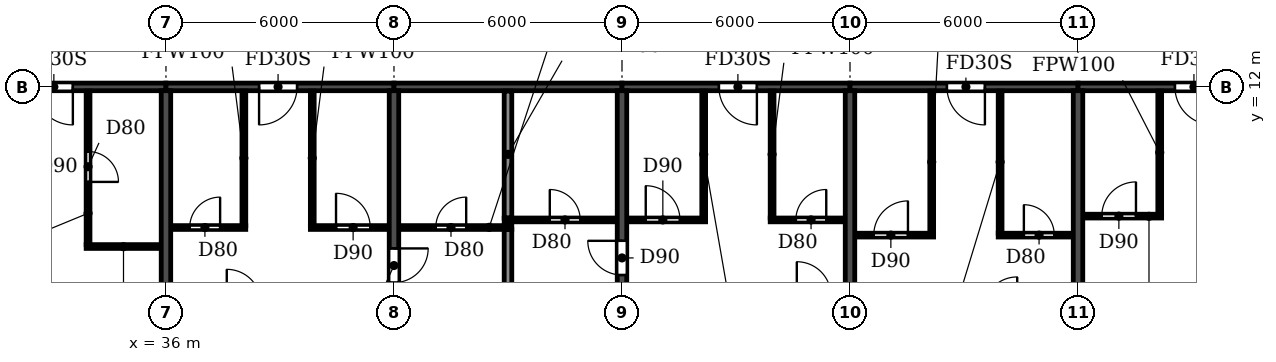
"""IFC4 building model, lengths in metres.
Left out: names, types, materials, properties, quantities, classifications, styles, units other than length and angle.
Written with IfcOpenShell. Run it as: python <this file> out.ifc"""

import sys

from ifc_helpers import new_model, si_unit, direction, frame, frame_2d, origin, place, context, subcontext, project, spatial, rectangle, extrude, element, fill, save


model = new_model("IFC4")
c1 = context("Model", 3, precision=1e-05, world=origin(), true_north=direction((0.0, 1.0)))
c2 = subcontext(c1, "Body", "Model", "MODEL_VIEW")
j1 = project(units=[si_unit("LENGTHUNIT", "METRE"), si_unit("PLANEANGLEUNIT", "RADIAN")], contexts=[c1])
p1 = place(None, origin())
s1 = spatial("IfcSite", under=j1, at=p1, CompositionType="ELEMENT")
p2 = place(p1, origin())
s2 = spatial("IfcBuilding", under=s1, at=p2, CompositionType="ELEMENT")
p3 = place(p2, frame((0.0, 0.0, 191.7)))
s3 = spatial("IfcBuildingStorey", under=s2, at=p3, CompositionType="ELEMENT", Elevation=191.7)
p4 = place(p3, frame((36.0, 0.2, 0.0), z_axis=(0.0, 0.0, 1.0), x_axis=(0.0, 1.0, 0.0)))
e1 = element("IfcWall", 1, at=p4, inside=s3, PredefinedType="SHEAR", context=c2, shape_type="SweptSolid", body=[
    extrude(rectangle(XDim=11.7, YDim=0.25, at=frame_2d((5.85, 0.0))), origin(), (0.0, 0.0, 1.0), 3.08),
])
p5 = place(p3, frame((42.0, 0.2, 0.0), z_axis=(0.0, 0.0, 1.0), x_axis=(0.0, 1.0, 0.0)))
e2 = element("IfcWall", 2, at=p5, inside=s3, PredefinedType="SHEAR", context=c2, shape_type="SweptSolid", body=[
    extrude(rectangle(XDim=11.7, YDim=0.25, at=frame_2d((5.85, 0.0))), origin(), (0.0, 0.0, 1.0), 3.08),
])
p6 = place(p5, frame((6.65, 0.0, 0.0)))
e3 = element("IfcOpeningElement", 3, at=p6, cuts=e2, PredefinedType="OPENING", context=c2, shape_type="SweptSolid", body=[
    extrude(rectangle(XDim=0.9, YDim=2.1, at=frame_2d((0.45, 1.05))), frame((0.0, 0.135, 0.0), z_axis=(0.0, -1.0, 0.0), x_axis=(1.0, 0.0, 0.0)), (0.0, 0.0, 1.0), 0.27),
])
p7 = place(p3, frame((48.0, 0.2, 0.0), z_axis=(0.0, 0.0, 1.0), x_axis=(0.0, 1.0, 0.0)))
e4 = element("IfcWall", 4, at=p7, inside=s3, PredefinedType="SHEAR", context=c2, shape_type="SweptSolid", body=[
    extrude(rectangle(XDim=11.7, YDim=0.25, at=frame_2d((5.85, 0.0))), origin(), (0.0, 0.0, 1.0), 3.08),
])
p8 = place(p7, frame((6.85, 0.0, 0.0)))
e5 = element("IfcOpeningElement", 5, at=p8, cuts=e4, PredefinedType="OPENING", context=c2, shape_type="SweptSolid", body=[
    extrude(rectangle(XDim=0.9, YDim=2.1, at=frame_2d((0.45, 1.05))), frame((0.0, 0.135, 0.0), z_axis=(0.0, -1.0, 0.0), x_axis=(1.0, 0.0, 0.0)), (0.0, 0.0, 1.0), 0.27),
])
for number, where, z_axis, x_axis in (
    (6, (54.0, 0.2, 0.0), (0.0, 0.0, 1.0), (0.0, 1.0, 0.0)),
    (7, (60.0, 0.2, 0.0), (0.0, 0.0, 1.0), (0.0, 1.0, 0.0)),
):
    element("IfcWall", number, at=place(p3, frame(where, z_axis=z_axis, x_axis=x_axis)), inside=s3, PredefinedType="SHEAR", context=c2, shape_type="SweptSolid", body=[
        extrude(rectangle(XDim=11.7, YDim=0.25, at=frame_2d((5.85, 0.0))), origin(), (0.0, 0.0, 1.0), 3.08),
    ])
p9 = place(p3, frame((30.0, 12.0, 0.0), z_axis=(0.0, 0.0, 1.0), x_axis=(1.0, 0.0, 0.0)))
e8 = element("IfcWall", 8, at=p9, inside=s3, PredefinedType="SHEAR", context=c2, shape_type="SweptSolid", body=[
    extrude(rectangle(XDim=6.0, YDim=0.2, at=frame_2d((3.0, 0.0))), origin(), (0.0, 0.0, 1.0), 2.48),
])
p10 = place(p9, frame((2.55, 0.0, 0.0)))
e9 = element("IfcOpeningElement", 9, at=p10, cuts=e8, PredefinedType="OPENING", context=c2, shape_type="SweptSolid", body=[
    extrude(rectangle(XDim=1.0, YDim=2.1, at=frame_2d((0.5, 1.05))), frame((0.0, 0.11, 0.0), z_axis=(0.0, -1.0, 0.0), x_axis=(1.0, 0.0, 0.0)), (0.0, 0.0, 1.0), 0.22),
])
p11 = place(p3, frame((36.0, 12.0, 0.0), z_axis=(0.0, 0.0, 1.0), x_axis=(1.0, 0.0, 0.0)))
e10 = element("IfcWall", 10, at=p11, inside=s3, PredefinedType="SHEAR", context=c2, shape_type="SweptSolid", body=[
    extrude(rectangle(XDim=6.0, YDim=0.2, at=frame_2d((3.0, 0.0))), origin(), (0.0, 0.0, 1.0), 2.48),
])
p12 = place(p11, frame((2.45, 0.0, 0.0)))
e11 = element("IfcOpeningElement", 11, at=p12, cuts=e10, PredefinedType="OPENING", context=c2, shape_type="SweptSolid", body=[
    extrude(rectangle(XDim=1.0, YDim=2.1, at=frame_2d((0.5, 1.05))), frame((0.0, 0.11, 0.0), z_axis=(0.0, -1.0, 0.0), x_axis=(1.0, 0.0, 0.0)), (0.0, 0.0, 1.0), 0.22),
])
p13 = place(p3, frame((42.0, 12.0, 0.0), z_axis=(0.0, 0.0, 1.0), x_axis=(1.0, 0.0, 0.0)))
e12 = element("IfcWall", 12, at=p13, inside=s3, PredefinedType="SHEAR", context=c2, shape_type="SweptSolid", body=[
    extrude(rectangle(XDim=6.0, YDim=0.2, at=frame_2d((3.0, 0.0))), origin(), (0.0, 0.0, 1.0), 2.48),
])
p14 = place(p3, frame((48.0, 12.0, 0.0), z_axis=(0.0, 0.0, 1.0), x_axis=(1.0, 0.0, 0.0)))
e13 = element("IfcWall", 13, at=p14, inside=s3, PredefinedType="SHEAR", context=c2, shape_type="SweptSolid", body=[
    extrude(rectangle(XDim=6.0, YDim=0.2, at=frame_2d((3.0, 0.0))), origin(), (0.0, 0.0, 1.0), 2.48),
])
p15 = place(p14, frame((2.55, 0.0, 0.0)))
e14 = element("IfcOpeningElement", 14, at=p15, cuts=e13, PredefinedType="OPENING", context=c2, shape_type="SweptSolid", body=[
    extrude(rectangle(XDim=1.0, YDim=2.1, at=frame_2d((0.5, 1.05))), frame((0.0, 0.11, 0.0), z_axis=(0.0, -1.0, 0.0), x_axis=(1.0, 0.0, 0.0)), (0.0, 0.0, 1.0), 0.22),
])
p16 = place(p3, frame((54.0, 12.0, 0.0), z_axis=(0.0, 0.0, 1.0), x_axis=(1.0, 0.0, 0.0)))
e15 = element("IfcWall", 15, at=p16, inside=s3, PredefinedType="SHEAR", context=c2, shape_type="SweptSolid", body=[
    extrude(rectangle(XDim=6.0, YDim=0.2, at=frame_2d((3.0, 0.0))), origin(), (0.0, 0.0, 1.0), 2.48),
])
p17 = place(p16, frame((2.55, 0.0, 0.0)))
e16 = element("IfcOpeningElement", 16, at=p17, cuts=e15, PredefinedType="OPENING", context=c2, shape_type="SweptSolid", body=[
    extrude(rectangle(XDim=1.0, YDim=2.1, at=frame_2d((0.5, 1.05))), frame((0.0, 0.11, 0.0), z_axis=(0.0, -1.0, 0.0), x_axis=(1.0, 0.0, 0.0)), (0.0, 0.0, 1.0), 0.22),
])
p18 = place(p3, frame((60.0, 12.0, 0.0), z_axis=(0.0, 0.0, 1.0), x_axis=(1.0, 0.0, 0.0)))
e17 = element("IfcWall", 17, at=p18, inside=s3, PredefinedType="SHEAR", context=c2, shape_type="SweptSolid", body=[
    extrude(rectangle(XDim=6.0, YDim=0.2, at=frame_2d((3.0, 0.0))), origin(), (0.0, 0.0, 1.0), 2.48),
])
p19 = place(p18, frame((2.55, 0.0, 0.0)))
e18 = element("IfcOpeningElement", 18, at=p19, cuts=e17, PredefinedType="OPENING", context=c2, shape_type="SweptSolid", body=[
    extrude(rectangle(XDim=1.0, YDim=2.1, at=frame_2d((0.5, 1.05))), frame((0.0, 0.11, 0.0), z_axis=(0.0, -1.0, 0.0), x_axis=(1.0, 0.0, 0.0)), (0.0, 0.0, 1.0), 0.22),
])
p20 = place(p3, frame((45.0, 0.06, 0.0), z_axis=(0.0, 0.0, 1.0), x_axis=(0.0, 1.0, 0.0)))
e19 = element("IfcWall", 19, at=p20, inside=s3, PredefinedType="PARTITIONING", context=c2, shape_type="SweptSolid", body=[
    extrude(rectangle(XDim=8.19, YDim=0.2, at=frame_2d((4.095, 0.0))), origin(), (0.0, 0.0, 1.0), 3.08),
])
p21 = place(p3, frame((45.0, 8.55, 0.0), z_axis=(0.0, 0.0, 1.0), x_axis=(0.0, 1.0, 0.0)))
e20 = element("IfcWall", 20, at=p21, inside=s3, PredefinedType="PARTITIONING", context=c2, shape_type="SweptSolid", body=[
    extrude(rectangle(XDim=3.34, YDim=0.2, at=frame_2d((1.67, 0.0))), origin(), (0.0, 0.0, 1.0), 3.08),
])
p22 = place(p3, frame((33.9, 7.8, 0.0), z_axis=(0.0, 0.0, 1.0), x_axis=(1.0, 0.0, 0.0)))
e21 = element("IfcWall", 21, at=p22, inside=s3, PredefinedType="PARTITIONING", context=c2, shape_type="SweptSolid", body=[
    extrude(rectangle(XDim=1.965, YDim=0.1, at=frame_2d((0.982, 0.0))), origin(), (0.0, 0.0, 1.0), 3.08),
])
p23 = place(p3, frame((54.135, 8.1, 0.0), z_axis=(0.0, 0.0, 1.0), x_axis=(1.0, 0.0, 0.0)))
e22 = element("IfcWall", 22, at=p23, inside=s3, PredefinedType="PARTITIONING", context=c2, shape_type="SweptSolid", body=[
    extrude(rectangle(XDim=2.065, YDim=0.1, at=frame_2d((1.032, 0.0))), origin(), (0.0, 0.0, 1.0), 3.08),
])
p24 = place(p23, frame((0.49, 0.0, 0.0)))
e23 = element("IfcOpeningElement", 23, at=p24, cuts=e22, PredefinedType="OPENING", context=c2, shape_type="SweptSolid", body=[
    extrude(rectangle(XDim=0.9, YDim=2.1, at=frame_2d((0.45, 1.05))), frame((0.0, 0.06, 0.0), z_axis=(0.0, -1.0, 0.0), x_axis=(1.0, 0.0, 0.0)), (0.0, 0.0, 1.0), 0.12),
])
p25 = place(p3, frame((57.9, 8.1, 0.0), z_axis=(0.0, 0.0, 1.0), x_axis=(1.0, 0.0, 0.0)))
e24 = element("IfcWall", 24, at=p25, inside=s3, PredefinedType="PARTITIONING", context=c2, shape_type="SweptSolid", body=[
    extrude(rectangle(XDim=1.965, YDim=0.1, at=frame_2d((0.982, 0.0))), origin(), (0.0, 0.0, 1.0), 3.08),
])
p26 = place(p25, frame((0.675, 0.0, 0.0)))
e25 = element("IfcOpeningElement", 25, at=p26, cuts=e24, PredefinedType="OPENING", context=c2, shape_type="SweptSolid", body=[
    extrude(rectangle(XDim=0.8, YDim=2.1, at=frame_2d((0.4, 1.05))), frame((0.0, 0.06, 0.0), z_axis=(0.0, -1.0, 0.0), x_axis=(1.0, 0.0, 0.0)), (0.0, 0.0, 1.0), 0.12),
])
p27 = place(p3, frame((36.135, 8.3, 0.0), z_axis=(0.0, 0.0, 1.0), x_axis=(1.0, 0.0, 0.0)))
e26 = element("IfcWall", 26, at=p27, inside=s3, PredefinedType="PARTITIONING", context=c2, shape_type="SweptSolid", body=[
    extrude(rectangle(XDim=1.965, YDim=0.1, at=frame_2d((0.982, 0.0))), origin(), (0.0, 0.0, 1.0), 3.08),
])
p28 = place(p27, frame((0.49, 0.0, 0.0)))
e27 = element("IfcOpeningElement", 27, at=p28, cuts=e26, PredefinedType="OPENING", context=c2, shape_type="SweptSolid", body=[
    extrude(rectangle(XDim=0.8, YDim=2.1, at=frame_2d((0.4, 1.05))), frame((0.0, 0.06, 0.0), z_axis=(0.0, -1.0, 0.0), x_axis=(1.0, 0.0, 0.0)), (0.0, 0.0, 1.0), 0.12),
])
p29 = place(p3, frame((39.8, 8.3, 0.0), z_axis=(0.0, 0.0, 1.0), x_axis=(1.0, 0.0, 0.0)))
e28 = element("IfcWall", 28, at=p29, inside=s3, PredefinedType="PARTITIONING", context=c2, shape_type="SweptSolid", body=[
    extrude(rectangle(XDim=2.065, YDim=0.1, at=frame_2d((1.032, 0.0))), origin(), (0.0, 0.0, 1.0), 3.08),
])
p30 = place(p29, frame((0.675, 0.0, 0.0)))
e29 = element("IfcOpeningElement", 29, at=p30, cuts=e28, PredefinedType="OPENING", context=c2, shape_type="SweptSolid", body=[
    extrude(rectangle(XDim=0.9, YDim=2.1, at=frame_2d((0.45, 1.05))), frame((0.0, 0.06, 0.0), z_axis=(0.0, -1.0, 0.0), x_axis=(1.0, 0.0, 0.0)), (0.0, 0.0, 1.0), 0.12),
])
p31 = place(p3, frame((42.135, 8.3, 0.0), z_axis=(0.0, 0.0, 1.0), x_axis=(1.0, 0.0, 0.0)))
e30 = element("IfcWall", 30, at=p31, inside=s3, PredefinedType="PARTITIONING", context=c2, shape_type="SweptSolid", body=[
    extrude(rectangle(XDim=2.965, YDim=0.1, at=frame_2d((1.482, 0.0))), origin(), (0.0, 0.0, 1.0), 3.08),
])
p32 = place(p31, frame((0.965, 0.0, 0.0)))
e31 = element("IfcOpeningElement", 31, at=p32, cuts=e30, PredefinedType="OPENING", context=c2, shape_type="SweptSolid", body=[
    extrude(rectangle(XDim=0.8, YDim=2.1, at=frame_2d((0.4, 1.05))), frame((0.0, 0.06, 0.0), z_axis=(0.0, -1.0, 0.0), x_axis=(1.0, 0.0, 0.0)), (0.0, 0.0, 1.0), 0.12),
])
p33 = place(p3, frame((44.9, 8.5, 0.0), z_axis=(0.0, 0.0, 1.0), x_axis=(1.0, 0.0, 0.0)))
e32 = element("IfcWall", 32, at=p33, inside=s3, PredefinedType="PARTITIONING", context=c2, shape_type="SweptSolid", body=[
    extrude(rectangle(XDim=2.965, YDim=0.1, at=frame_2d((1.482, 0.0))), origin(), (0.0, 0.0, 1.0), 3.08),
])
p34 = place(p33, frame((1.2, 0.0, 0.0)))
e33 = element("IfcOpeningElement", 33, at=p34, cuts=e32, PredefinedType="OPENING", context=c2, shape_type="SweptSolid", body=[
    extrude(rectangle(XDim=0.8, YDim=2.1, at=frame_2d((0.4, 1.05))), frame((0.0, 0.06, 0.0), z_axis=(0.0, -1.0, 0.0), x_axis=(1.0, 0.0, 0.0)), (0.0, 0.0, 1.0), 0.12),
])
p35 = place(p3, frame((48.135, 8.5, 0.0), z_axis=(0.0, 0.0, 1.0), x_axis=(1.0, 0.0, 0.0)))
e34 = element("IfcWall", 34, at=p35, inside=s3, PredefinedType="PARTITIONING", context=c2, shape_type="SweptSolid", body=[
    extrude(rectangle(XDim=2.065, YDim=0.1, at=frame_2d((1.032, 0.0))), origin(), (0.0, 0.0, 1.0), 3.08),
])
p36 = place(p35, frame((0.49, 0.0, 0.0)))
e35 = element("IfcOpeningElement", 35, at=p36, cuts=e34, PredefinedType="OPENING", context=c2, shape_type="SweptSolid", body=[
    extrude(rectangle(XDim=0.9, YDim=2.1, at=frame_2d((0.45, 1.05))), frame((0.0, 0.06, 0.0), z_axis=(0.0, -1.0, 0.0), x_axis=(1.0, 0.0, 0.0)), (0.0, 0.0, 1.0), 0.12),
])
p37 = place(p3, frame((51.9, 8.5, 0.0), z_axis=(0.0, 0.0, 1.0), x_axis=(1.0, 0.0, 0.0)))
e36 = element("IfcWall", 36, at=p37, inside=s3, PredefinedType="PARTITIONING", context=c2, shape_type="SweptSolid", body=[
    extrude(rectangle(XDim=1.965, YDim=0.1, at=frame_2d((0.982, 0.0))), origin(), (0.0, 0.0, 1.0), 3.08),
])
p38 = place(p37, frame((0.675, 0.0, 0.0)))
e37 = element("IfcOpeningElement", 37, at=p38, cuts=e36, PredefinedType="OPENING", context=c2, shape_type="SweptSolid", body=[
    extrude(rectangle(XDim=0.8, YDim=2.1, at=frame_2d((0.4, 1.05))), frame((0.0, 0.06, 0.0), z_axis=(0.0, -1.0, 0.0), x_axis=(1.0, 0.0, 0.0)), (0.0, 0.0, 1.0), 0.12),
])
p39 = place(p3, frame((60.135, 8.6, 0.0), z_axis=(0.0, 0.0, 1.0), x_axis=(1.0, 0.0, 0.0)))
e38 = element("IfcWall", 38, at=p39, inside=s3, PredefinedType="PARTITIONING", context=c2, shape_type="SweptSolid", body=[
    extrude(rectangle(XDim=2.065, YDim=0.1, at=frame_2d((1.032, 0.0))), origin(), (0.0, 0.0, 1.0), 3.08),
])
p40 = place(p39, frame((0.49, 0.0, 0.0)))
e39 = element("IfcOpeningElement", 39, at=p40, cuts=e38, PredefinedType="OPENING", context=c2, shape_type="SweptSolid", body=[
    extrude(rectangle(XDim=0.9, YDim=2.1, at=frame_2d((0.45, 1.05))), frame((0.0, 0.06, 0.0), z_axis=(0.0, -1.0, 0.0), x_axis=(1.0, 0.0, 0.0)), (0.0, 0.0, 1.0), 0.12),
])
p41 = place(p3, frame((33.95, 7.85, 0.0), z_axis=(0.0, 0.0, 1.0), x_axis=(0.0, 1.0, 0.0)))
e40 = element("IfcWall", 40, at=p41, inside=s3, PredefinedType="PARTITIONING", context=c2, shape_type="SweptSolid", body=[
    extrude(rectangle(XDim=4.04, YDim=0.1, at=frame_2d((2.02, 0.0))), origin(), (0.0, 0.0, 1.0), 3.08),
])
p42 = place(p41, frame((1.65, 0.0, 0.0)))
e41 = element("IfcOpeningElement", 41, at=p42, cuts=e40, PredefinedType="OPENING", context=c2, shape_type="SweptSolid", body=[
    extrude(rectangle(XDim=0.8, YDim=2.1, at=frame_2d((0.4, 1.05))), frame((0.0, 0.06, 0.0), z_axis=(0.0, -1.0, 0.0), x_axis=(1.0, 0.0, 0.0)), (0.0, 0.0, 1.0), 0.12),
])
for number, where, z_axis, x_axis in (
    (42, (38.05, 8.35, 0.0), (0.0, 0.0, 1.0), (0.0, 1.0, 0.0)),
    (43, (39.85, 8.35, 0.0), (0.0, 0.0, 1.0), (0.0, 1.0, 0.0)),
):
    element("IfcWall", number, at=place(p3, frame(where, z_axis=z_axis, x_axis=x_axis)), inside=s3, PredefinedType="PARTITIONING", context=c2, shape_type="SweptSolid", body=[
        extrude(rectangle(XDim=3.54, YDim=0.1, at=frame_2d((1.77, 0.0))), origin(), (0.0, 0.0, 1.0), 3.08),
    ])
for number, where, z_axis, x_axis in (
    (44, (50.15, 8.55, 0.0), (0.0, 0.0, 1.0), (0.0, 1.0, 0.0)),
    (45, (51.95, 8.55, 0.0), (0.0, 0.0, 1.0), (0.0, 1.0, 0.0)),
):
    element("IfcWall", number, at=place(p3, frame(where, z_axis=z_axis, x_axis=x_axis)), inside=s3, PredefinedType="PARTITIONING", context=c2, shape_type="SweptSolid", body=[
        extrude(rectangle(XDim=3.34, YDim=0.1, at=frame_2d((1.67, 0.0))), origin(), (0.0, 0.0, 1.0), 3.08),
    ])
for number, where, z_axis, x_axis in (
    (46, (56.15, 8.15, 0.0), (0.0, 0.0, 1.0), (0.0, 1.0, 0.0)),
    (47, (57.95, 8.15, 0.0), (0.0, 0.0, 1.0), (0.0, 1.0, 0.0)),
):
    element("IfcWall", number, at=place(p3, frame(where, z_axis=z_axis, x_axis=x_axis)), inside=s3, PredefinedType="PARTITIONING", context=c2, shape_type="SweptSolid", body=[
        extrude(rectangle(XDim=3.74, YDim=0.1, at=frame_2d((1.87, 0.0))), origin(), (0.0, 0.0, 1.0), 3.08),
    ])
p43 = place(p3, frame((62.15, 8.65, 0.0), z_axis=(0.0, 0.0, 1.0), x_axis=(0.0, 1.0, 0.0)))
e48 = element("IfcWall", 48, at=p43, inside=s3, PredefinedType="PARTITIONING", context=c2, shape_type="SweptSolid", body=[
    extrude(rectangle(XDim=3.24, YDim=0.1, at=frame_2d((1.62, 0.0))), origin(), (0.0, 0.0, 1.0), 3.08),
])
p44 = place(p10, frame((1.0, 0.0, 0.0), z_axis=(0.0, 0.0, 1.0), x_axis=(-1.0, 0.0, 0.0)))
e49 = element("IfcDoor", 49, at=p44, inside=s3, OperationType="SINGLE_SWING_LEFT", PredefinedType="DOOR", context=c2, shape_type="SweptSolid", body=[
    extrude(rectangle(XDim=1.0, YDim=2.1, at=frame_2d((0.5, 1.05))), frame((0.0, 0.025, 0.0), z_axis=(0.0, -1.0, 0.0), x_axis=(1.0, 0.0, 0.0)), (0.0, 0.0, 1.0), 0.05),
])
fill(e9, e49)
p45 = place(p42, frame((0.8, 0.0, 0.0), z_axis=(0.0, 0.0, 1.0), x_axis=(-1.0, 0.0, 0.0)))
e50 = element("IfcDoor", 50, at=p45, inside=s3, OperationType="SINGLE_SWING_RIGHT", PredefinedType="DOOR", context=c2, shape_type="SweptSolid", body=[
    extrude(rectangle(XDim=0.8, YDim=2.1, at=frame_2d((0.4, 1.05))), frame((0.0, 0.025, 0.0), z_axis=(0.0, -1.0, 0.0), x_axis=(1.0, 0.0, 0.0)), (0.0, 0.0, 1.0), 0.05),
])
fill(e41, e50)
p46 = place(p32, origin())
e51 = element("IfcDoor", 51, at=p46, inside=s3, OperationType="SINGLE_SWING_RIGHT", PredefinedType="DOOR", context=c2, shape_type="SweptSolid", body=[
    extrude(rectangle(XDim=0.8, YDim=2.1, at=frame_2d((0.4, 1.05))), frame((0.0, 0.025, 0.0), z_axis=(0.0, -1.0, 0.0), x_axis=(1.0, 0.0, 0.0)), (0.0, 0.0, 1.0), 0.05),
])
fill(e31, e51)
p47 = place(p28, origin())
e52 = element("IfcDoor", 52, at=p47, inside=s3, OperationType="SINGLE_SWING_RIGHT", PredefinedType="DOOR", context=c2, shape_type="SweptSolid", body=[
    extrude(rectangle(XDim=0.8, YDim=2.1, at=frame_2d((0.4, 1.05))), frame((0.0, 0.025, 0.0), z_axis=(0.0, -1.0, 0.0), x_axis=(1.0, 0.0, 0.0)), (0.0, 0.0, 1.0), 0.05),
])
fill(e27, e52)
p48 = place(p12, frame((1.0, 0.0, 0.0), z_axis=(0.0, 0.0, 1.0), x_axis=(-1.0, 0.0, 0.0)))
e53 = element("IfcDoor", 53, at=p48, inside=s3, OperationType="SINGLE_SWING_RIGHT", PredefinedType="DOOR", context=c2, shape_type="SweptSolid", body=[
    extrude(rectangle(XDim=1.0, YDim=2.1, at=frame_2d((0.5, 1.05))), frame((0.0, 0.025, 0.0), z_axis=(0.0, -1.0, 0.0), x_axis=(1.0, 0.0, 0.0)), (0.0, 0.0, 1.0), 0.05),
])
fill(e11, e53)
p49 = place(p30, origin())
e54 = element("IfcDoor", 54, at=p49, inside=s3, OperationType="SINGLE_SWING_LEFT", PredefinedType="DOOR", context=c2, shape_type="SweptSolid", body=[
    extrude(rectangle(XDim=0.9, YDim=2.1, at=frame_2d((0.45, 1.05))), frame((0.0, 0.025, 0.0), z_axis=(0.0, -1.0, 0.0), x_axis=(1.0, 0.0, 0.0)), (0.0, 0.0, 1.0), 0.05),
])
fill(e29, e54)
p50 = place(p6, frame((0.9, 0.0, 0.0), z_axis=(0.0, 0.0, 1.0), x_axis=(-1.0, 0.0, 0.0)))
e55 = element("IfcDoor", 55, at=p50, inside=s3, OperationType="SINGLE_SWING_LEFT", PredefinedType="DOOR", context=c2, shape_type="SweptSolid", body=[
    extrude(rectangle(XDim=0.9, YDim=2.1, at=frame_2d((0.45, 1.05))), frame((0.0, 0.025, 0.0), z_axis=(0.0, -1.0, 0.0), x_axis=(1.0, 0.0, 0.0)), (0.0, 0.0, 1.0), 0.05),
])
fill(e3, e55)
p51 = place(p34, origin())
e56 = element("IfcDoor", 56, at=p51, inside=s3, OperationType="SINGLE_SWING_LEFT", PredefinedType="DOOR", context=c2, shape_type="SweptSolid", body=[
    extrude(rectangle(XDim=0.8, YDim=2.1, at=frame_2d((0.4, 1.05))), frame((0.0, 0.025, 0.0), z_axis=(0.0, -1.0, 0.0), x_axis=(1.0, 0.0, 0.0)), (0.0, 0.0, 1.0), 0.05),
])
fill(e33, e56)
p52 = place(p8, origin())
e57 = element("IfcDoor", 57, at=p52, inside=s3, OperationType="SINGLE_SWING_RIGHT", PredefinedType="DOOR", context=c2, shape_type="SweptSolid", body=[
    extrude(rectangle(XDim=0.9, YDim=2.1, at=frame_2d((0.45, 1.05))), frame((0.0, 0.025, 0.0), z_axis=(0.0, -1.0, 0.0), x_axis=(1.0, 0.0, 0.0)), (0.0, 0.0, 1.0), 0.05),
])
fill(e5, e57)
p53 = place(p36, origin())
e58 = element("IfcDoor", 58, at=p53, inside=s3, OperationType="SINGLE_SWING_LEFT", PredefinedType="DOOR", context=c2, shape_type="SweptSolid", body=[
    extrude(rectangle(XDim=0.9, YDim=2.1, at=frame_2d((0.45, 1.05))), frame((0.0, 0.025, 0.0), z_axis=(0.0, -1.0, 0.0), x_axis=(1.0, 0.0, 0.0)), (0.0, 0.0, 1.0), 0.05),
])
fill(e35, e58)
p54 = place(p15, frame((1.0, 0.0, 0.0), z_axis=(0.0, 0.0, 1.0), x_axis=(-1.0, 0.0, 0.0)))
e59 = element("IfcDoor", 59, at=p54, inside=s3, OperationType="SINGLE_SWING_LEFT", PredefinedType="DOOR", context=c2, shape_type="SweptSolid", body=[
    extrude(rectangle(XDim=1.0, YDim=2.1, at=frame_2d((0.5, 1.05))), frame((0.0, 0.025, 0.0), z_axis=(0.0, -1.0, 0.0), x_axis=(1.0, 0.0, 0.0)), (0.0, 0.0, 1.0), 0.05),
])
fill(e14, e59)
p55 = place(p38, origin())
e60 = element("IfcDoor", 60, at=p55, inside=s3, OperationType="SINGLE_SWING_RIGHT", PredefinedType="DOOR", context=c2, shape_type="SweptSolid", body=[
    extrude(rectangle(XDim=0.8, YDim=2.1, at=frame_2d((0.4, 1.05))), frame((0.0, 0.025, 0.0), z_axis=(0.0, -1.0, 0.0), x_axis=(1.0, 0.0, 0.0)), (0.0, 0.0, 1.0), 0.05),
])
fill(e37, e60)
p56 = place(p24, origin())
e61 = element("IfcDoor", 61, at=p56, inside=s3, OperationType="SINGLE_SWING_RIGHT", PredefinedType="DOOR", context=c2, shape_type="SweptSolid", body=[
    extrude(rectangle(XDim=0.9, YDim=2.1, at=frame_2d((0.45, 1.05))), frame((0.0, 0.025, 0.0), z_axis=(0.0, -1.0, 0.0), x_axis=(1.0, 0.0, 0.0)), (0.0, 0.0, 1.0), 0.05),
])
fill(e23, e61)
p57 = place(p17, frame((1.0, 0.0, 0.0), z_axis=(0.0, 0.0, 1.0), x_axis=(-1.0, 0.0, 0.0)))
e62 = element("IfcDoor", 62, at=p57, inside=s3, OperationType="SINGLE_SWING_LEFT", PredefinedType="DOOR", context=c2, shape_type="SweptSolid", body=[
    extrude(rectangle(XDim=1.0, YDim=2.1, at=frame_2d((0.5, 1.05))), frame((0.0, 0.025, 0.0), z_axis=(0.0, -1.0, 0.0), x_axis=(1.0, 0.0, 0.0)), (0.0, 0.0, 1.0), 0.05),
])
fill(e16, e62)
p58 = place(p26, origin())
e63 = element("IfcDoor", 63, at=p58, inside=s3, OperationType="SINGLE_SWING_LEFT", PredefinedType="DOOR", context=c2, shape_type="SweptSolid", body=[
    extrude(rectangle(XDim=0.8, YDim=2.1, at=frame_2d((0.4, 1.05))), frame((0.0, 0.025, 0.0), z_axis=(0.0, -1.0, 0.0), x_axis=(1.0, 0.0, 0.0)), (0.0, 0.0, 1.0), 0.05),
])
fill(e25, e63)
p59 = place(p40, origin())
e64 = element("IfcDoor", 64, at=p59, inside=s3, OperationType="SINGLE_SWING_RIGHT", PredefinedType="DOOR", context=c2, shape_type="SweptSolid", body=[
    extrude(rectangle(XDim=0.9, YDim=2.1, at=frame_2d((0.45, 1.05))), frame((0.0, 0.025, 0.0), z_axis=(0.0, -1.0, 0.0), x_axis=(1.0, 0.0, 0.0)), (0.0, 0.0, 1.0), 0.05),
])
fill(e39, e64)
p60 = place(p19, frame((1.0, 0.0, 0.0), z_axis=(0.0, 0.0, 1.0), x_axis=(-1.0, 0.0, 0.0)))
e65 = element("IfcDoor", 65, at=p60, inside=s3, OperationType="SINGLE_SWING_LEFT", PredefinedType="DOOR", context=c2, shape_type="SweptSolid", body=[
    extrude(rectangle(XDim=1.0, YDim=2.1, at=frame_2d((0.5, 1.05))), frame((0.0, 0.025, 0.0), z_axis=(0.0, -1.0, 0.0), x_axis=(1.0, 0.0, 0.0)), (0.0, 0.0, 1.0), 0.05),
])
fill(e18, e65)
save(model, sys.argv[1])
